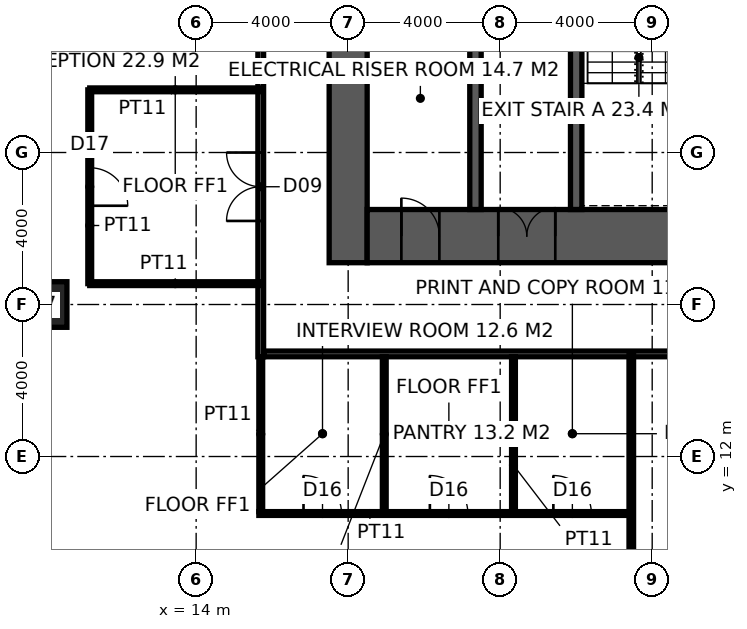
"""IFC4 building model, lengths in metres.
Left out: names, types, materials, properties, quantities, classifications, styles, units other than length and angle.
Written with IfcOpenShell. Run it as: python <this file> out.ifc"""

import sys

from ifc_helpers import new_model, si_unit, direction, frame, frame_2d, origin, origin_2d, place, context, subcontext, project, spatial, rectangle, hollow_rectangle, extrude, element, fill, save


model = new_model("IFC4")
c1 = context("Model", 3, precision=1e-05, world=origin(), true_north=direction((0.0, 1.0)))
c2 = subcontext(c1, "Body", "Model", "MODEL_VIEW")
j1 = project(units=[si_unit("LENGTHUNIT", "METRE"), si_unit("PLANEANGLEUNIT", "RADIAN")], contexts=[c1])
p1 = place(None, origin())
s1 = spatial("IfcSite", under=j1, at=p1, CompositionType="ELEMENT")
p2 = place(p1, origin())
s2 = spatial("IfcBuilding", under=s1, at=p2, CompositionType="ELEMENT")
p3 = place(p2, frame((0.0, 0.0, 11.0)))
s3 = spatial("IfcBuildingStorey", under=s2, at=p3, CompositionType="ELEMENT", Elevation=11.0)
p4 = place(p3, frame((10.0, 16.0, 0.0), z_axis=(0.0, 0.0, 1.0), x_axis=(1.0, 0.0, 0.0)))
e1 = element("IfcColumn", 1, at=p4, inside=s3, PredefinedType="COLUMN", context=c2, shape_type="SweptSolid", body=[
    extrude(hollow_rectangle(XDim=1.2, YDim=1.2, WallThickness=0.1, at=origin_2d()), origin(), (0.0, 0.0, 1.0), 4.0),
])
p5 = place(p3, frame((18.0, 17.1, -0.15), z_axis=(0.0, 0.0, 1.0), x_axis=(0.0, 1.0, 0.0)))
e2 = element("IfcWall", 2, at=p5, inside=s3, PredefinedType="SHEAR", context=c2, shape_type="SweptSolid", body=[
    extrude(rectangle(XDim=19.8, YDim=1.0, at=frame_2d((9.9, 0.0))), origin(), (0.0, 0.0, 1.0), 4.0),
])
p6 = place(p3, frame((18.5, 17.8, -0.15), z_axis=(0.0, 0.0, 1.0), x_axis=(1.0, 0.0, 0.0)))
e3 = element("IfcWall", 3, at=p6, inside=s3, PredefinedType="SHEAR", context=c2, shape_type="SweptSolid", body=[
    extrude(rectangle(XDim=23.0, YDim=1.4, at=frame_2d((11.5, 0.0))), origin(), (0.0, 0.0, 1.0), 4.0),
])
p7 = place(p6, frame((3.45, 0.0, 0.15)))
e4 = element("IfcOpeningElement", 4, at=p7, cuts=e3, PredefinedType="OPENING", context=c2, shape_type="SweptSolid", body=[
    extrude(rectangle(XDim=1.5, YDim=2.4, at=frame_2d((0.75, 1.2))), frame((0.0, 0.71, 0.0), z_axis=(0.0, -1.0, 0.0), x_axis=(1.0, 0.0, 0.0)), (0.0, 0.0, 1.0), 1.42),
])
p8 = place(p6, frame((17.9, 0.0, 0.15)))
e5 = element("IfcOpeningElement", 5, at=p8, cuts=e3, PredefinedType="OPENING", context=c2, shape_type="SweptSolid", body=[
    extrude(rectangle(XDim=1.5, YDim=2.4, at=frame_2d((0.75, 1.2))), frame((0.0, 0.71, 0.0), z_axis=(0.0, -1.0, 0.0), x_axis=(1.0, 0.0, 0.0)), (0.0, 0.0, 1.0), 1.42),
])
p9 = place(p6, frame((0.9, 0.0, 0.15)))
e6 = element("IfcOpeningElement", 6, at=p9, cuts=e3, PredefinedType="OPENING", context=c2, shape_type="SweptSolid", body=[
    extrude(rectangle(XDim=1.0, YDim=2.2, at=frame_2d((0.5, 1.1))), frame((0.0, 0.71, 0.0), z_axis=(0.0, -1.0, 0.0), x_axis=(1.0, 0.0, 0.0)), (0.0, 0.0, 1.0), 1.42),
])
p10 = place(p3, frame((24.0, 18.5, -0.15), z_axis=(0.0, 0.0, 1.0), x_axis=(0.0, 1.0, 0.0)))
e7 = element("IfcWall", 7, at=p10, inside=s3, PredefinedType="SHEAR", context=c2, shape_type="SweptSolid", body=[
    extrude(rectangle(XDim=17.0, YDim=0.3, at=frame_2d((8.5, 0.0))), origin(), (0.0, 0.0, 1.0), 4.0),
])
p11 = place(p10, frame((9.6, 0.0, 0.15)))
e8 = element("IfcOpeningElement", 8, at=p11, cuts=e7, PredefinedType="OPENING", context=c2, shape_type="SweptSolid", body=[
    extrude(rectangle(XDim=1.5, YDim=2.4, at=frame_2d((0.75, 1.2))), frame((0.0, 0.16, 0.0), z_axis=(0.0, -1.0, 0.0), x_axis=(1.0, 0.0, 0.0)), (0.0, 0.0, 1.0), 0.32),
])
p12 = place(p3, frame((21.35, 18.5, -0.15), z_axis=(0.0, 0.0, 1.0), x_axis=(0.0, 1.0, 0.0)))
e9 = element("IfcWall", 9, at=p12, inside=s3, PredefinedType="SHEAR", context=c2, shape_type="SweptSolid", body=[
    extrude(rectangle(XDim=12.5, YDim=0.3, at=frame_2d((6.25, 0.0))), origin(), (0.0, 0.0, 1.0), 4.0),
])
p13 = place(p12, frame((8.15, 0.0, 0.15)))
e10 = element("IfcOpeningElement", 10, at=p13, cuts=e9, PredefinedType="OPENING", context=c2, shape_type="SweptSolid", body=[
    extrude(rectangle(XDim=1.0, YDim=2.2, at=frame_2d((0.5, 1.1))), frame((0.0, 0.16, 0.0), z_axis=(0.0, -1.0, 0.0), x_axis=(1.0, 0.0, 0.0)), (0.0, 0.0, 1.0), 0.32),
])
p14 = place(p3, frame((15.7, 14.625, 0.0), z_axis=(0.0, 0.0, 1.0), x_axis=(0.0, 1.0, 0.0)))
e11 = element("IfcWall", 11, at=p14, inside=s3, PredefinedType="PARTITIONING", context=c2, shape_type="SweptSolid", body=[
    extrude(rectangle(XDim=24.15, YDim=0.15, at=frame_2d((12.075, 0.0))), origin(), (0.0, 0.0, 1.0), 3.85),
])
p15 = place(p14, frame((3.574, 0.0, 0.0)))
e12 = element("IfcOpeningElement", 12, at=p15, cuts=e11, PredefinedType="OPENING", context=c2, shape_type="SweptSolid", body=[
    extrude(rectangle(XDim=1.8, YDim=2.4, at=frame_2d((0.9, 1.2))), frame((0.0, 0.085, 0.0), z_axis=(0.0, -1.0, 0.0), x_axis=(1.0, 0.0, 0.0)), (0.0, 0.0, 1.0), 0.17),
])
p16 = place(p14, frame((18.075, 0.0, 0.0)))
e13 = element("IfcOpeningElement", 13, at=p16, cuts=e11, PredefinedType="OPENING", context=c2, shape_type="SweptSolid", body=[
    extrude(rectangle(XDim=1.8, YDim=2.4, at=frame_2d((0.9, 1.2))), frame((0.0, 0.085, 0.0), z_axis=(0.0, -1.0, 0.0), x_axis=(1.0, 0.0, 0.0)), (0.0, 0.0, 1.0), 0.17),
])
p17 = place(p14, frame((10.875, 0.0, 0.0)))
e14 = element("IfcOpeningElement", 14, at=p17, cuts=e11, PredefinedType="OPENING", context=c2, shape_type="SweptSolid", body=[
    extrude(rectangle(XDim=1.0, YDim=2.2, at=frame_2d((0.5, 1.1))), frame((0.0, 0.085, 0.0), z_axis=(0.0, -1.0, 0.0), x_axis=(1.0, 0.0, 0.0)), (0.0, 0.0, 1.0), 0.17),
])
p18 = place(p3, frame((15.775, 14.7, 0.0), z_axis=(0.0, 0.0, 1.0), x_axis=(1.0, 0.0, 0.0)))
e15 = element("IfcWall", 15, at=p18, inside=s3, PredefinedType="PARTITIONING", context=c2, shape_type="SweptSolid", body=[
    extrude(rectangle(XDim=28.45, YDim=0.15, at=frame_2d((14.225, 0.0))), origin(), (0.0, 0.0, 1.0), 3.85),
])
p19 = place(p18, frame((11.725, 0.0, 0.0)))
e16 = element("IfcOpeningElement", 16, at=p19, cuts=e15, PredefinedType="OPENING", context=c2, shape_type="SweptSolid", body=[
    extrude(rectangle(XDim=1.0, YDim=2.2, at=frame_2d((0.5, 1.1))), frame((0.0, 0.085, 0.0), z_axis=(0.0, -1.0, 0.0), x_axis=(1.0, 0.0, 0.0)), (0.0, 0.0, 1.0), 0.17),
])
p20 = place(p3, frame((25.45, -3.32, 0.0), z_axis=(0.0, 0.0, 1.0), x_axis=(0.0, 1.0, 0.0)))
e17 = element("IfcWall", 17, at=p20, inside=s3, PredefinedType="PARTITIONING", context=c2, shape_type="SweptSolid", body=[
    extrude(rectangle(XDim=18.02, YDim=0.12, at=frame_2d((9.01, 0.0))), origin(), (0.0, 0.0, 1.0), 2.65),
])
p21 = place(p3, frame((15.65, 10.5, 0.0), z_axis=(0.0, 0.0, 1.0), x_axis=(1.0, 0.0, 0.0)))
e18 = element("IfcWall", 18, at=p21, inside=s3, PredefinedType="PARTITIONING", context=c2, shape_type="SweptSolid", body=[
    extrude(rectangle(XDim=9.739, YDim=0.1, at=frame_2d((4.87, 0.0))), origin(), (0.0, 0.0, 1.0), 3.85),
])
p22 = place(p21, frame((1.175, 0.0, 0.0)))
e19 = element("IfcOpeningElement", 19, at=p22, cuts=e18, PredefinedType="OPENING", context=c2, shape_type="SweptSolid", body=[
    extrude(rectangle(XDim=1.0, YDim=2.2, at=frame_2d((0.5, 1.1))), frame((0.0, 0.06, 0.0), z_axis=(0.0, -1.0, 0.0), x_axis=(1.0, 0.0, 0.0)), (0.0, 0.0, 1.0), 0.12),
])
p23 = place(p21, frame((4.5, 0.0, 0.0)))
e20 = element("IfcOpeningElement", 20, at=p23, cuts=e18, PredefinedType="OPENING", context=c2, shape_type="SweptSolid", body=[
    extrude(rectangle(XDim=1.0, YDim=2.2, at=frame_2d((0.5, 1.1))), frame((0.0, 0.06, 0.0), z_axis=(0.0, -1.0, 0.0), x_axis=(1.0, 0.0, 0.0)), (0.0, 0.0, 1.0), 0.12),
])
p24 = place(p21, frame((7.75, 0.0, 0.0)))
e21 = element("IfcOpeningElement", 21, at=p24, cuts=e18, PredefinedType="OPENING", context=c2, shape_type="SweptSolid", body=[
    extrude(rectangle(XDim=1.0, YDim=2.2, at=frame_2d((0.5, 1.1))), frame((0.0, 0.06, 0.0), z_axis=(0.0, -1.0, 0.0), x_axis=(1.0, 0.0, 0.0)), (0.0, 0.0, 1.0), 0.12),
])
for number, where, z_axis, x_axis in (
    (22, (15.7, 10.55, 0.0), (0.0, 0.0, 1.0), (0.0, 1.0, 0.0)),
    (23, (18.95, 10.55, 0.0), (0.0, 0.0, 1.0), (0.0, 1.0, 0.0)),
    (24, (22.35, 10.55, 0.0), (0.0, 0.0, 1.0), (0.0, 1.0, 0.0)),
):
    element("IfcWall", number, at=place(p3, frame(where, z_axis=z_axis, x_axis=x_axis)), inside=s3, PredefinedType="PARTITIONING", context=c2, shape_type="SweptSolid", body=[
        extrude(rectangle(XDim=4.075, YDim=0.1, at=frame_2d((2.038, 0.0))), origin(), (0.0, 0.0, 1.0), 3.85),
    ])
p25 = place(p3, frame((15.7, 21.649, 0.0), z_axis=(0.0, 0.0, 1.0), x_axis=(-1.0, 0.0, 0.0)))
e25 = element("IfcWall", 25, at=p25, inside=s3, PredefinedType="PARTITIONING", context=c2, shape_type="SweptSolid", body=[
    extrude(rectangle(XDim=4.5, YDim=0.1, at=frame_2d((2.25, 0.0))), origin(), (0.0, 0.0, 1.0), 3.85),
])
p26 = place(p3, frame((11.2, 21.649, 0.0), z_axis=(0.0, 0.0, 1.0), x_axis=(0.0, -1.0, 0.0)))
e26 = element("IfcWall", 26, at=p26, inside=s3, PredefinedType="PARTITIONING", context=c2, shape_type="SweptSolid", body=[
    extrude(rectangle(XDim=5.1, YDim=0.1, at=frame_2d((2.55, 0.0))), origin(), (0.0, 0.0, 1.0), 3.85),
])
p27 = place(p26, frame((2.05, 0.0, 0.0)))
e27 = element("IfcOpeningElement", 27, at=p27, cuts=e26, PredefinedType="OPENING", context=c2, shape_type="SweptSolid", body=[
    extrude(rectangle(XDim=1.0, YDim=2.2, at=frame_2d((0.5, 1.1))), frame((0.0, 0.06, 0.0), z_axis=(0.0, -1.0, 0.0), x_axis=(1.0, 0.0, 0.0)), (0.0, 0.0, 1.0), 0.12),
])
p28 = place(p3, frame((11.2, 16.549, 0.0), z_axis=(0.0, 0.0, 1.0), x_axis=(1.0, 0.0, 0.0)))
e28 = element("IfcWall", 28, at=p28, inside=s3, PredefinedType="PARTITIONING", context=c2, shape_type="SweptSolid", body=[
    extrude(rectangle(XDim=4.5, YDim=0.1, at=frame_2d((2.25, 0.0))), origin(), (0.0, 0.0, 1.0), 3.85),
])
p29 = place(p7, origin())
e29 = element("IfcDoor", 29, at=p29, inside=s3, OperationType="DOUBLE_DOOR_DOUBLE_SWING", PredefinedType="DOOR", context=c2, shape_type="SweptSolid", body=[
    extrude(rectangle(XDim=1.5, YDim=2.4, at=frame_2d((0.75, 1.2))), frame((0.0, 0.025, 0.0), z_axis=(0.0, -1.0, 0.0), x_axis=(1.0, 0.0, 0.0)), (0.0, 0.0, 1.0), 0.05),
])
fill(e4, e29)
p30 = place(p9, origin())
e30 = element("IfcDoor", 30, at=p30, inside=s3, OperationType="SINGLE_SWING_LEFT", PredefinedType="DOOR", context=c2, shape_type="SweptSolid", body=[
    extrude(rectangle(XDim=1.0, YDim=2.2, at=frame_2d((0.5, 1.1))), frame((0.0, 0.025, 0.0), z_axis=(0.0, -1.0, 0.0), x_axis=(1.0, 0.0, 0.0)), (0.0, 0.0, 1.0), 0.05),
])
fill(e6, e30)
p31 = place(p15, origin())
e31 = element("IfcDoor", 31, at=p31, inside=s3, OperationType="DOUBLE_DOOR_DOUBLE_SWING", PredefinedType="DOOR", context=c2, shape_type="SweptSolid", body=[
    extrude(rectangle(XDim=1.8, YDim=2.4, at=frame_2d((0.9, 1.2))), frame((0.0, 0.025, 0.0), z_axis=(0.0, -1.0, 0.0), x_axis=(1.0, 0.0, 0.0)), (0.0, 0.0, 1.0), 0.05),
])
fill(e12, e31)
p32 = place(p22, origin())
e32 = element("IfcDoor", 32, at=p32, inside=s3, OperationType="SINGLE_SWING_LEFT", PredefinedType="DOOR", context=c2, shape_type="SweptSolid", body=[
    extrude(rectangle(XDim=1.0, YDim=2.2, at=frame_2d((0.5, 1.1))), frame((0.0, 0.025, 0.0), z_axis=(0.0, -1.0, 0.0), x_axis=(1.0, 0.0, 0.0)), (0.0, 0.0, 1.0), 0.05),
])
fill(e19, e32)
p33 = place(p23, origin())
e33 = element("IfcDoor", 33, at=p33, inside=s3, OperationType="SINGLE_SWING_LEFT", PredefinedType="DOOR", context=c2, shape_type="SweptSolid", body=[
    extrude(rectangle(XDim=1.0, YDim=2.2, at=frame_2d((0.5, 1.1))), frame((0.0, 0.025, 0.0), z_axis=(0.0, -1.0, 0.0), x_axis=(1.0, 0.0, 0.0)), (0.0, 0.0, 1.0), 0.05),
])
fill(e20, e33)
p34 = place(p24, origin())
e34 = element("IfcDoor", 34, at=p34, inside=s3, OperationType="SINGLE_SWING_LEFT", PredefinedType="DOOR", context=c2, shape_type="SweptSolid", body=[
    extrude(rectangle(XDim=1.0, YDim=2.2, at=frame_2d((0.5, 1.1))), frame((0.0, 0.025, 0.0), z_axis=(0.0, -1.0, 0.0), x_axis=(1.0, 0.0, 0.0)), (0.0, 0.0, 1.0), 0.05),
])
fill(e21, e34)
p35 = place(p27, origin())
e35 = element("IfcDoor", 35, at=p35, inside=s3, OperationType="SINGLE_SWING_RIGHT", PredefinedType="DOOR", context=c2, shape_type="SweptSolid", body=[
    extrude(rectangle(XDim=1.0, YDim=2.2, at=frame_2d((0.5, 1.1))), frame((0.0, 0.025, 0.0), z_axis=(0.0, -1.0, 0.0), x_axis=(1.0, 0.0, 0.0)), (0.0, 0.0, 1.0), 0.05),
])
fill(e27, e35)
save(model, sys.argv[1])
